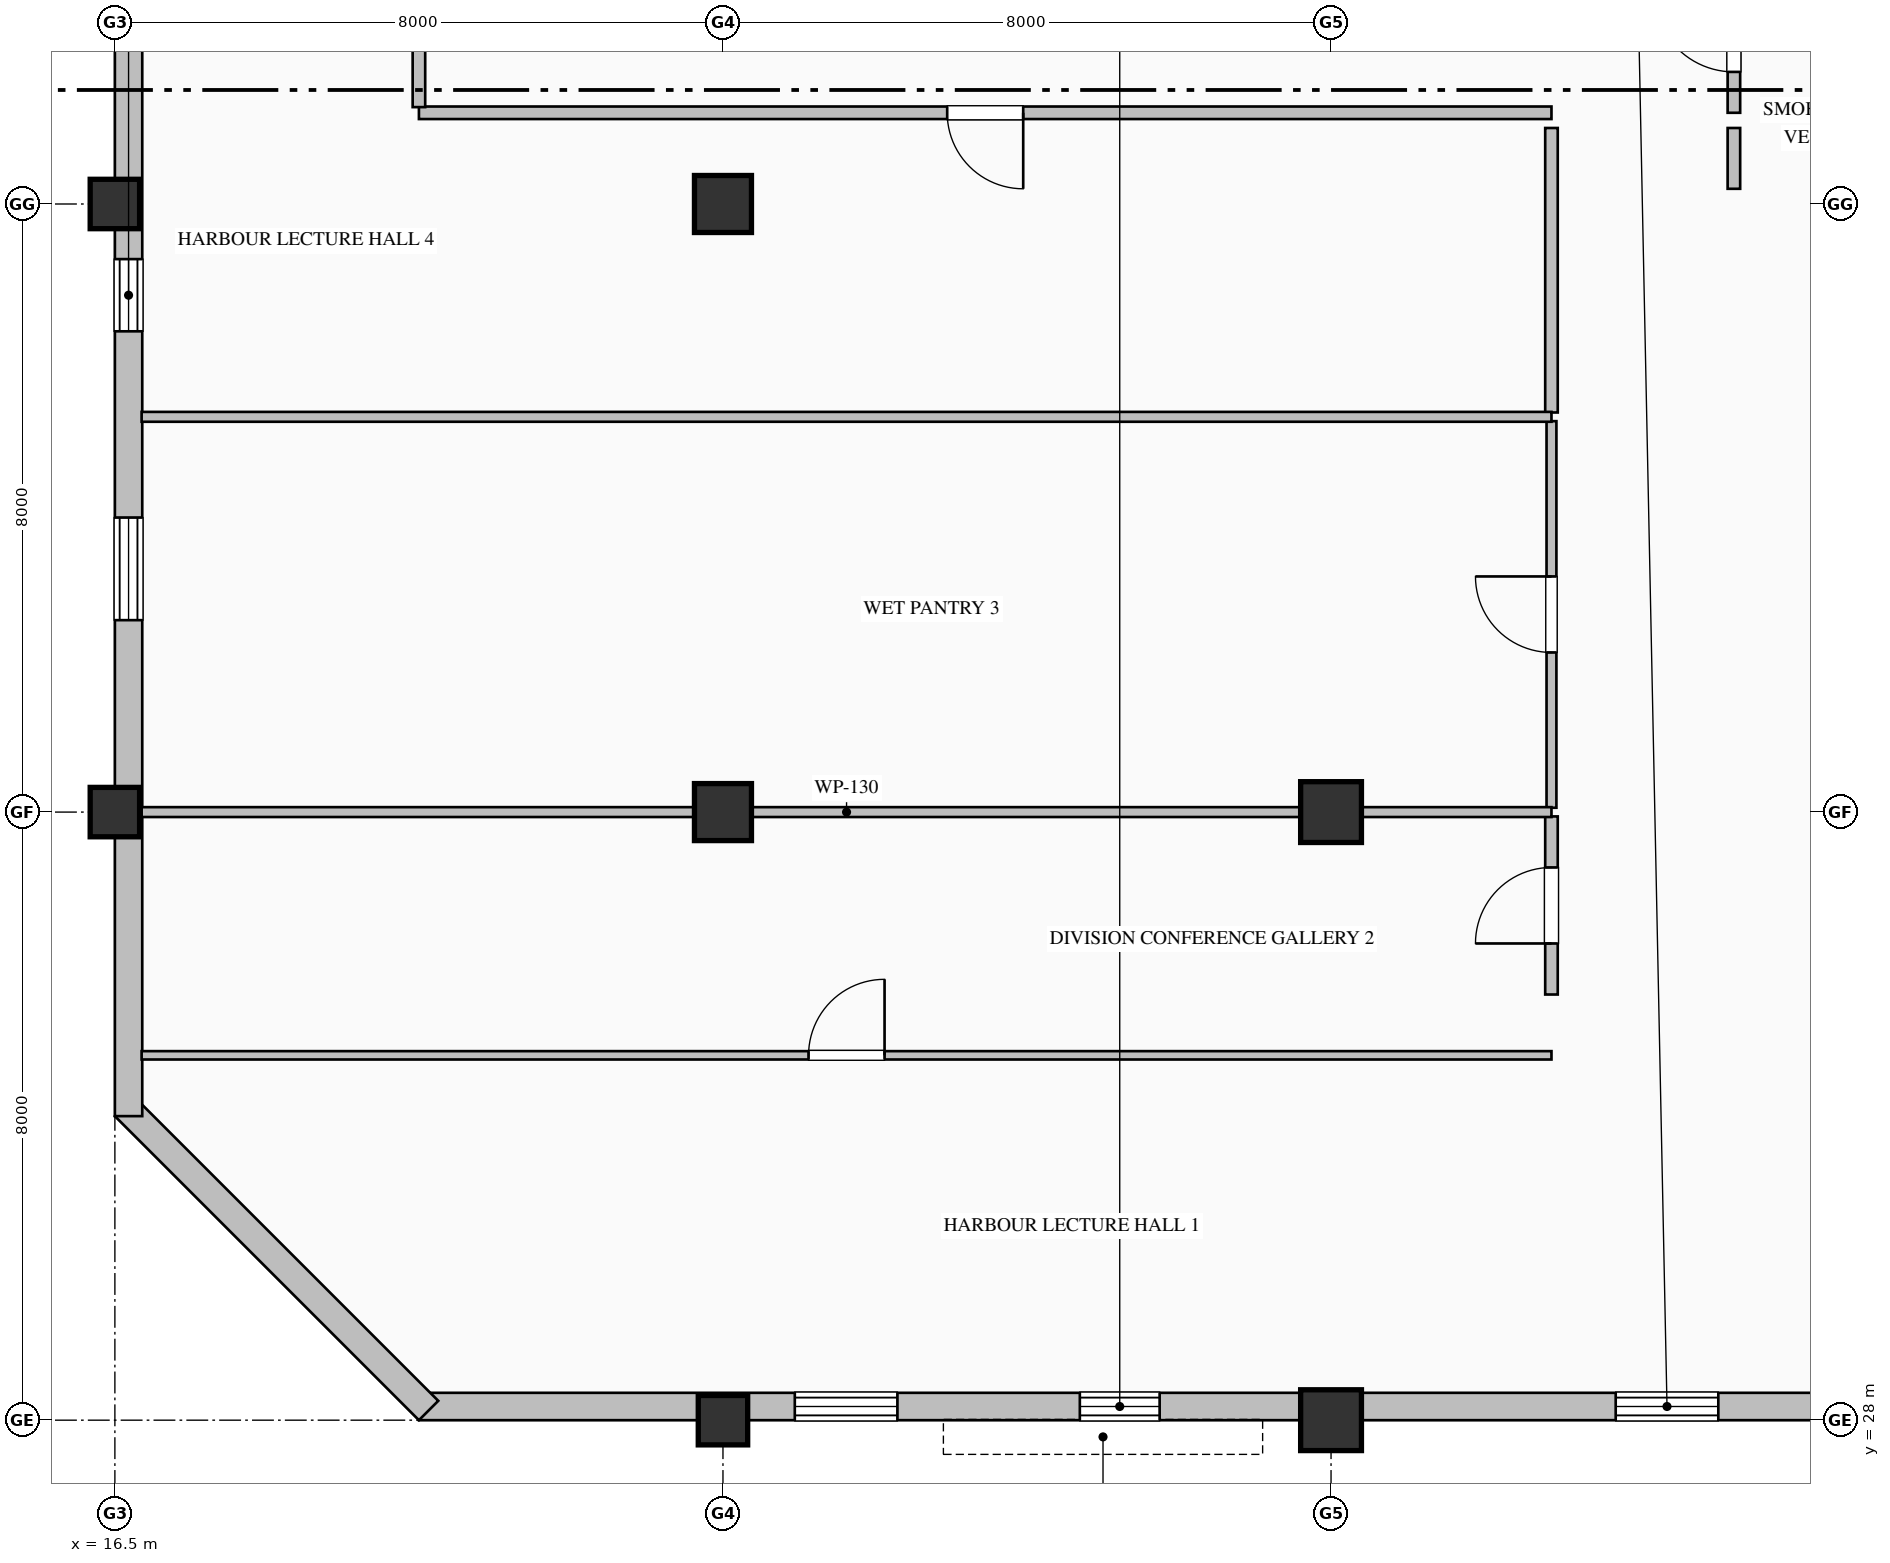
"""IFC4 building model, lengths in metres.
Left out: names, types, materials, properties, quantities, classifications, styles, units other than length and angle.
Written with IfcOpenShell. Run it as: python <this file> out.ifc"""

import sys

from ifc_helpers import new_model, si_unit, direction, frame, frame_2d, origin, origin_2d, place, context, subcontext, project, spatial, rectangle, hollow_rectangle, extrude, element, fill, save


model = new_model("IFC4")
c1 = context("Model", 3, precision=1e-05, world=origin(), true_north=direction((0.0, 1.0)))
c2 = subcontext(c1, "Body", "Model", "MODEL_VIEW")
j1 = project(units=[si_unit("LENGTHUNIT", "METRE"), si_unit("PLANEANGLEUNIT", "RADIAN")], contexts=[c1])
p1 = place(None, origin())
s1 = spatial("IfcSite", under=j1, at=p1, CompositionType="ELEMENT")
p2 = place(p1, origin())
s2 = spatial("IfcBuilding", under=s1, at=p2, CompositionType="ELEMENT")
p3 = place(p2, frame((0.0, 0.0, 303.2)))
s3 = spatial("IfcBuildingStorey", under=s2, at=p3, CompositionType="ELEMENT", Elevation=303.2)
for number, where, z_axis, x_axis in (
    (1, (16.5, 36.0, 0.0), (0.0, 0.0, 1.0), (1.0, 0.0, 0.0)),
    (2, (16.5, 44.0, 0.0), (0.0, 0.0, 1.0), (1.0, 0.0, 0.0)),
    (3, (24.5, 28.0, 0.0), (0.0, 0.0, 1.0), (1.0, 0.0, 0.0)),
):
    element("IfcColumn", number, at=place(p3, frame(where, z_axis=z_axis, x_axis=x_axis)), inside=s3, PredefinedType="COLUMN", context=c2, shape_type="SweptSolid", body=[
        extrude(hollow_rectangle(XDim=0.65, YDim=0.65, WallThickness=0.028, at=origin_2d()), origin(), (0.0, 0.0, 1.0), 4.0),
    ])
for number, where, z_axis, x_axis in (
    (4, (24.5, 36.0, 0.0), (0.0, 0.0, 1.0), (1.0, 0.0, 0.0)),
    (5, (24.5, 44.0, 0.0), (0.0, 0.0, 1.0), (1.0, 0.0, 0.0)),
):
    element("IfcColumn", number, at=place(p3, frame(where, z_axis=z_axis, x_axis=x_axis)), inside=s3, PredefinedType="COLUMN", context=c2, shape_type="SweptSolid", body=[
        extrude(rectangle(XDim=0.75, YDim=0.75, at=origin_2d()), origin(), (0.0, 0.0, 1.0), 4.0),
    ])
for number, where, z_axis, x_axis in (
    (6, (32.5, 28.0, 0.0), (0.0, 0.0, 1.0), (1.0, 0.0, 0.0)),
    (7, (32.5, 36.0, 0.0), (0.0, 0.0, 1.0), (1.0, 0.0, 0.0)),
):
    element("IfcColumn", number, at=place(p3, frame(where, z_axis=z_axis, x_axis=x_axis)), inside=s3, PredefinedType="COLUMN", context=c2, shape_type="SweptSolid", body=[
        extrude(hollow_rectangle(XDim=0.8, YDim=0.8, WallThickness=0.032, at=origin_2d()), origin(), (0.0, 0.0, 1.0), 4.0),
    ])
p4 = place(p3, frame((40.52, 28.18, 0.0), z_axis=(0.0, 0.0, 1.0), x_axis=(-1.0, 0.0, 0.0)))
e8 = element("IfcWall", 8, at=p4, inside=s3, PredefinedType="SOLIDWALL", context=c2, shape_type="SweptSolid", body=[
    extrude(rectangle(XDim=20.02, YDim=0.36, at=frame_2d((10.01, 0.0))), origin(), (0.0, 0.0, 1.0), 3.185),
])
p5 = place(p4, frame((2.925, 0.0, 0.9)))
e9 = element("IfcOpeningElement", 9, at=p5, cuts=e8, PredefinedType="OPENING", context=c2, shape_type="SweptSolid", body=[
    extrude(rectangle(XDim=1.35, YDim=1.85, at=frame_2d((0.675, 0.925))), frame((0.0, 0.19, 0.0), z_axis=(0.0, -1.0, 0.0), x_axis=(1.0, 0.0, 0.0)), (0.0, 0.0, 1.0), 0.38),
])
p6 = place(p4, frame((10.275, 0.0, 0.8)))
e10 = element("IfcOpeningElement", 10, at=p6, cuts=e8, PredefinedType="OPENING", context=c2, shape_type="SweptSolid", body=[
    extrude(rectangle(XDim=1.05, YDim=2.15, at=frame_2d((0.525, 1.075))), frame((0.0, 0.19, 0.0), z_axis=(0.0, -1.0, 0.0), x_axis=(1.0, 0.0, 0.0)), (0.0, 0.0, 1.0), 0.38),
])
p7 = place(p4, frame((13.725, 0.0, 0.9)))
e11 = element("IfcOpeningElement", 11, at=p7, cuts=e8, PredefinedType="OPENING", context=c2, shape_type="SweptSolid", body=[
    extrude(rectangle(XDim=1.35, YDim=1.85, at=frame_2d((0.675, 0.925))), frame((0.0, 0.19, 0.0), z_axis=(0.0, -1.0, 0.0), x_axis=(1.0, 0.0, 0.0)), (0.0, 0.0, 1.0), 0.38),
])
p8 = place(p3, frame((20.627, 28.127, 0.0), z_axis=(0.0, 0.0, 1.0), x_axis=(-0.707106781187, 0.707106781187, 0.0)))
e12 = element("IfcWall", 12, at=p8, inside=s3, PredefinedType="SOLIDWALL", context=c2, shape_type="SweptSolid", body=[
    extrude(rectangle(XDim=5.657, YDim=0.36, at=frame_2d((2.828, 0.0))), origin(), (0.0, 0.0, 1.0), 3.785),
])
p9 = place(p3, frame((16.68, 32.0, 0.0), z_axis=(0.0, 0.0, 1.0), x_axis=(0.0, 1.0, 0.0)))
e13 = element("IfcWall", 13, at=p9, inside=s3, PredefinedType="SOLIDWALL", context=c2, shape_type="SweptSolid", body=[
    extrude(rectangle(XDim=16.0, YDim=0.36, at=frame_2d((8.0, 0.0))), origin(), (0.0, 0.0, 1.0), 3.335),
])
p10 = place(p9, frame((6.525, 0.0, 0.9)))
e14 = element("IfcOpeningElement", 14, at=p10, cuts=e13, PredefinedType="OPENING", context=c2, shape_type="SweptSolid", body=[
    extrude(rectangle(XDim=1.35, YDim=1.85, at=frame_2d((0.675, 0.925))), frame((0.0, 0.19, 0.0), z_axis=(0.0, -1.0, 0.0), x_axis=(1.0, 0.0, 0.0)), (0.0, 0.0, 1.0), 0.38),
])
p11 = place(p9, frame((10.325, 0.0, 0.9)))
e15 = element("IfcOpeningElement", 15, at=p11, cuts=e13, PredefinedType="OPENING", context=c2, shape_type="SweptSolid", body=[
    extrude(rectangle(XDim=0.95, YDim=1.85, at=frame_2d((0.475, 0.925))), frame((0.0, 0.19, 0.0), z_axis=(0.0, -1.0, 0.0), x_axis=(1.0, 0.0, 0.0)), (0.0, 0.0, 1.0), 0.38),
])
p12 = place(p3, frame((37.8, 45.2, 0.0), z_axis=(0.0, 0.0, 1.0), x_axis=(0.0, 1.0, 0.0)))
e16 = element("IfcWall", 16, at=p12, inside=s3, PredefinedType="PARTITIONING", context=c2, shape_type="SweptSolid", body=[
    extrude(rectangle(XDim=2.125, YDim=0.165, at=frame_2d((1.063, 0.0))), origin(), (0.0, 0.0, 1.0), 3.785),
])
p13 = place(p12, frame((0.538, 0.0, 0.0)))
e17 = element("IfcOpeningElement", 17, at=p13, cuts=e16, PredefinedType="OPENING", context=c2, shape_type="SweptSolid", body=[
    extrude(rectangle(XDim=1.05, YDim=2.15, at=frame_2d((0.525, 1.075))), frame((0.0, 0.093, 0.0), z_axis=(0.0, -1.0, 0.0), x_axis=(1.0, 0.0, 0.0)), (0.0, 0.0, 1.0), 0.185),
])
p14 = place(p3, frame((37.8, 44.2, 0.0), z_axis=(0.0, 0.0, 1.0), x_axis=(0.0, 1.0, 0.0)))
e18 = element("IfcWall", 18, at=p14, inside=s3, PredefinedType="PARTITIONING", context=c2, shape_type="SweptSolid", body=[
    extrude(rectangle(XDim=0.8, YDim=0.165, at=frame_2d((0.4, 0.0))), origin(), (0.0, 0.0, 1.0), 3.785),
])
p15 = place(p3, frame((35.4, 45.2, 0.0), z_axis=(0.0, 0.0, 1.0), x_axis=(-1.0, 0.0, 0.0)))
e19 = element("IfcWall", 19, at=p15, inside=s3, PredefinedType="PARTITIONING", context=c2, shape_type="SweptSolid", body=[
    extrude(rectangle(XDim=14.9, YDim=0.165, at=frame_2d((7.45, 0.0))), origin(), (0.0, 0.0, 1.0), 3.785),
])
p16 = place(p15, frame((6.95, 0.0, 0.0)))
e20 = element("IfcOpeningElement", 20, at=p16, cuts=e19, PredefinedType="OPENING", context=c2, shape_type="SweptSolid", body=[
    extrude(rectangle(XDim=1.0, YDim=2.15, at=frame_2d((0.5, 1.075))), frame((0.0, 0.093, 0.0), z_axis=(0.0, -1.0, 0.0), x_axis=(1.0, 0.0, 0.0)), (0.0, 0.0, 1.0), 0.185),
])
p17 = place(p3, frame((20.5, 45.274, 0.0), z_axis=(0.0, 0.0, 1.0), x_axis=(0.0, 1.0, 0.0)))
e21 = element("IfcWall", 21, at=p17, inside=s3, PredefinedType="PARTITIONING", context=c2, shape_type="SweptSolid", body=[
    extrude(rectangle(XDim=2.051, YDim=0.165, at=frame_2d((1.025, 0.0))), origin(), (0.0, 0.0, 1.0), 3.785),
])
p18 = place(p3, frame((35.4, 33.6, 0.0), z_axis=(0.0, 0.0, 1.0), x_axis=(0.0, 1.0, 0.0)))
e22 = element("IfcWall", 22, at=p18, inside=s3, PredefinedType="PARTITIONING", context=c2, shape_type="SweptSolid", body=[
    extrude(rectangle(XDim=2.343, YDim=0.165, at=frame_2d((1.171, 0.0))), origin(), (0.0, 0.0, 1.0), 3.785),
])
p19 = place(p18, frame((0.671, 0.0, 0.0)))
e23 = element("IfcOpeningElement", 23, at=p19, cuts=e22, PredefinedType="OPENING", context=c2, shape_type="SweptSolid", body=[
    extrude(rectangle(XDim=1.0, YDim=2.15, at=frame_2d((0.5, 1.075))), frame((0.0, 0.093, 0.0), z_axis=(0.0, -1.0, 0.0), x_axis=(1.0, 0.0, 0.0)), (0.0, 0.0, 1.0), 0.185),
])
p20 = place(p3, frame((35.4, 36.057, 0.0), z_axis=(0.0, 0.0, 1.0), x_axis=(0.0, 1.0, 0.0)))
e24 = element("IfcWall", 24, at=p20, inside=s3, PredefinedType="PARTITIONING", context=c2, shape_type="SweptSolid", body=[
    extrude(rectangle(XDim=5.086, YDim=0.13, at=frame_2d((2.543, 0.0))), origin(), (0.0, 0.0, 1.0), 3.785),
])
p21 = place(p20, frame((2.043, 0.0, 0.0)))
e25 = element("IfcOpeningElement", 25, at=p21, cuts=e24, PredefinedType="OPENING", context=c2, shape_type="SweptSolid", body=[
    extrude(rectangle(XDim=1.0, YDim=2.15, at=frame_2d((0.5, 1.075))), frame((0.0, 0.075, 0.0), z_axis=(0.0, -1.0, 0.0), x_axis=(1.0, 0.0, 0.0)), (0.0, 0.0, 1.0), 0.15),
])
p22 = place(p3, frame((35.4, 41.257, 0.0), z_axis=(0.0, 0.0, 1.0), x_axis=(0.0, 1.0, 0.0)))
e26 = element("IfcWall", 26, at=p22, inside=s3, PredefinedType="PARTITIONING", context=c2, shape_type="SweptSolid", body=[
    extrude(rectangle(XDim=3.743, YDim=0.165, at=frame_2d((1.872, 0.0))), origin(), (0.0, 0.0, 1.0), 3.785),
])
p23 = place(p3, frame((16.852, 32.8, 0.0), z_axis=(0.0, 0.0, 1.0), x_axis=(1.0, 0.0, 0.0)))
e27 = element("IfcWall", 27, at=p23, inside=s3, PredefinedType="MOVABLE", context=c2, shape_type="SweptSolid", body=[
    extrude(rectangle(XDim=18.548, YDim=0.11, at=frame_2d((9.274, 0.0))), origin(), (0.0, 0.0, 1.0), 3.785),
])
p24 = place(p23, frame((8.774, 0.0, 0.0)))
e28 = element("IfcOpeningElement", 28, at=p24, cuts=e27, PredefinedType="OPENING", context=c2, shape_type="SweptSolid", body=[
    extrude(rectangle(XDim=1.0, YDim=2.15, at=frame_2d((0.5, 1.075))), frame((0.0, 0.065, 0.0), z_axis=(0.0, -1.0, 0.0), x_axis=(1.0, 0.0, 0.0)), (0.0, 0.0, 1.0), 0.13),
])
p25 = place(p3, frame((16.852, 36.0, 0.0), z_axis=(0.0, 0.0, 1.0), x_axis=(1.0, 0.0, 0.0)))
e29 = element("IfcWall", 29, at=p25, inside=s3, PredefinedType="PARTITIONING", context=c2, shape_type="SweptSolid", body=[
    extrude(rectangle(XDim=18.548, YDim=0.13, at=frame_2d((9.274, 0.0))), origin(), (0.0, 0.0, 1.0), 3.177),
])
p26 = place(p3, frame((16.852, 41.2, 0.0), z_axis=(0.0, 0.0, 1.0), x_axis=(1.0, 0.0, 0.0)))
e30 = element("IfcWall", 30, at=p26, inside=s3, PredefinedType="PARTITIONING", context=c2, shape_type="SweptSolid", body=[
    extrude(rectangle(XDim=18.548, YDim=0.13, at=frame_2d((9.274, 0.0))), origin(), (0.0, 0.0, 1.0), 3.785),
])
p27 = place(p5, origin())
e31 = element("IfcWindow", 31, at=p27, inside=s3, PartitioningType="DOUBLE_PANEL_VERTICAL", PredefinedType="WINDOW", context=c2, shape_type="SweptSolid", body=[
    extrude(rectangle(XDim=1.35, YDim=1.85, at=frame_2d((0.675, 0.925))), frame((0.0, 0.15, 0.0), z_axis=(0.0, -1.0, 0.0), x_axis=(1.0, 0.0, 0.0)), (0.0, 0.0, 1.0), 0.06),
])
fill(e9, e31)
p28 = place(p6, origin())
e32 = element("IfcWindow", 32, at=p28, inside=s3, PartitioningType="SINGLE_PANEL", PredefinedType="WINDOW", context=c2, shape_type="SweptSolid", body=[
    extrude(rectangle(XDim=1.05, YDim=2.15, at=frame_2d((0.525, 1.075))), frame((0.0, 0.15, 0.0), z_axis=(0.0, -1.0, 0.0), x_axis=(1.0, 0.0, 0.0)), (0.0, 0.0, 1.0), 0.06),
])
fill(e10, e32)
p29 = place(p7, origin())
e33 = element("IfcWindow", 33, at=p29, inside=s3, PartitioningType="DOUBLE_PANEL_VERTICAL", PredefinedType="WINDOW", context=c2, shape_type="SweptSolid", body=[
    extrude(rectangle(XDim=1.35, YDim=1.85, at=frame_2d((0.675, 0.925))), frame((0.0, 0.15, 0.0), z_axis=(0.0, -1.0, 0.0), x_axis=(1.0, 0.0, 0.0)), (0.0, 0.0, 1.0), 0.06),
])
fill(e11, e33)
p30 = place(p10, origin())
e34 = element("IfcWindow", 34, at=p30, inside=s3, PartitioningType="DOUBLE_PANEL_VERTICAL", PredefinedType="WINDOW", context=c2, shape_type="SweptSolid", body=[
    extrude(rectangle(XDim=1.35, YDim=1.85, at=frame_2d((0.675, 0.925))), frame((0.0, 0.15, 0.0), z_axis=(0.0, -1.0, 0.0), x_axis=(1.0, 0.0, 0.0)), (0.0, 0.0, 1.0), 0.06),
])
fill(e14, e34)
p31 = place(p11, origin())
e35 = element("IfcWindow", 35, at=p31, inside=s3, PartitioningType="SINGLE_PANEL", PredefinedType="WINDOW", context=c2, shape_type="SweptSolid", body=[
    extrude(rectangle(XDim=0.95, YDim=1.85, at=frame_2d((0.475, 0.925))), frame((0.0, 0.15, 0.0), z_axis=(0.0, -1.0, 0.0), x_axis=(1.0, 0.0, 0.0)), (0.0, 0.0, 1.0), 0.06),
])
fill(e15, e35)
p32 = place(p13, origin())
e36 = element("IfcDoor", 36, at=p32, inside=s3, OperationType="SINGLE_SWING_RIGHT", PredefinedType="DOOR", context=c2, shape_type="SweptSolid", body=[
    extrude(rectangle(XDim=1.05, YDim=2.15, at=frame_2d((0.525, 1.075))), frame((0.0, 0.025, 0.0), z_axis=(0.0, -1.0, 0.0), x_axis=(1.0, 0.0, 0.0)), (0.0, 0.0, 1.0), 0.05),
])
fill(e17, e36)
p33 = place(p24, origin())
e37 = element("IfcDoor", 37, at=p33, inside=s3, OperationType="SINGLE_SWING_RIGHT", PredefinedType="DOOR", context=c2, shape_type="SweptSolid", body=[
    extrude(rectangle(XDim=1.0, YDim=2.15, at=frame_2d((0.5, 1.075))), frame((0.0, 0.025, 0.0), z_axis=(0.0, -1.0, 0.0), x_axis=(1.0, 0.0, 0.0)), (0.0, 0.0, 1.0), 0.05),
])
fill(e28, e37)
p34 = place(p19, origin())
e38 = element("IfcDoor", 38, at=p34, inside=s3, OperationType="SINGLE_SWING_LEFT", PredefinedType="DOOR", context=c2, shape_type="SweptSolid", body=[
    extrude(rectangle(XDim=1.0, YDim=2.15, at=frame_2d((0.5, 1.075))), frame((0.0, 0.025, 0.0), z_axis=(0.0, -1.0, 0.0), x_axis=(1.0, 0.0, 0.0)), (0.0, 0.0, 1.0), 0.05),
])
fill(e23, e38)
p35 = place(p21, origin())
e39 = element("IfcDoor", 39, at=p35, inside=s3, OperationType="SINGLE_SWING_RIGHT", PredefinedType="DOOR", context=c2, shape_type="SweptSolid", body=[
    extrude(rectangle(XDim=1.0, YDim=2.15, at=frame_2d((0.5, 1.075))), frame((0.0, 0.025, 0.0), z_axis=(0.0, -1.0, 0.0), x_axis=(1.0, 0.0, 0.0)), (0.0, 0.0, 1.0), 0.05),
])
fill(e25, e39)
p36 = place(p16, origin())
e40 = element("IfcDoor", 40, at=p36, inside=s3, OperationType="SINGLE_SWING_LEFT", PredefinedType="DOOR", context=c2, shape_type="SweptSolid", body=[
    extrude(rectangle(XDim=1.0, YDim=2.15, at=frame_2d((0.5, 1.075))), frame((0.0, 0.025, 0.0), z_axis=(0.0, -1.0, 0.0), x_axis=(1.0, 0.0, 0.0)), (0.0, 0.0, 1.0), 0.05),
])
fill(e20, e40)
save(model, sys.argv[1])
